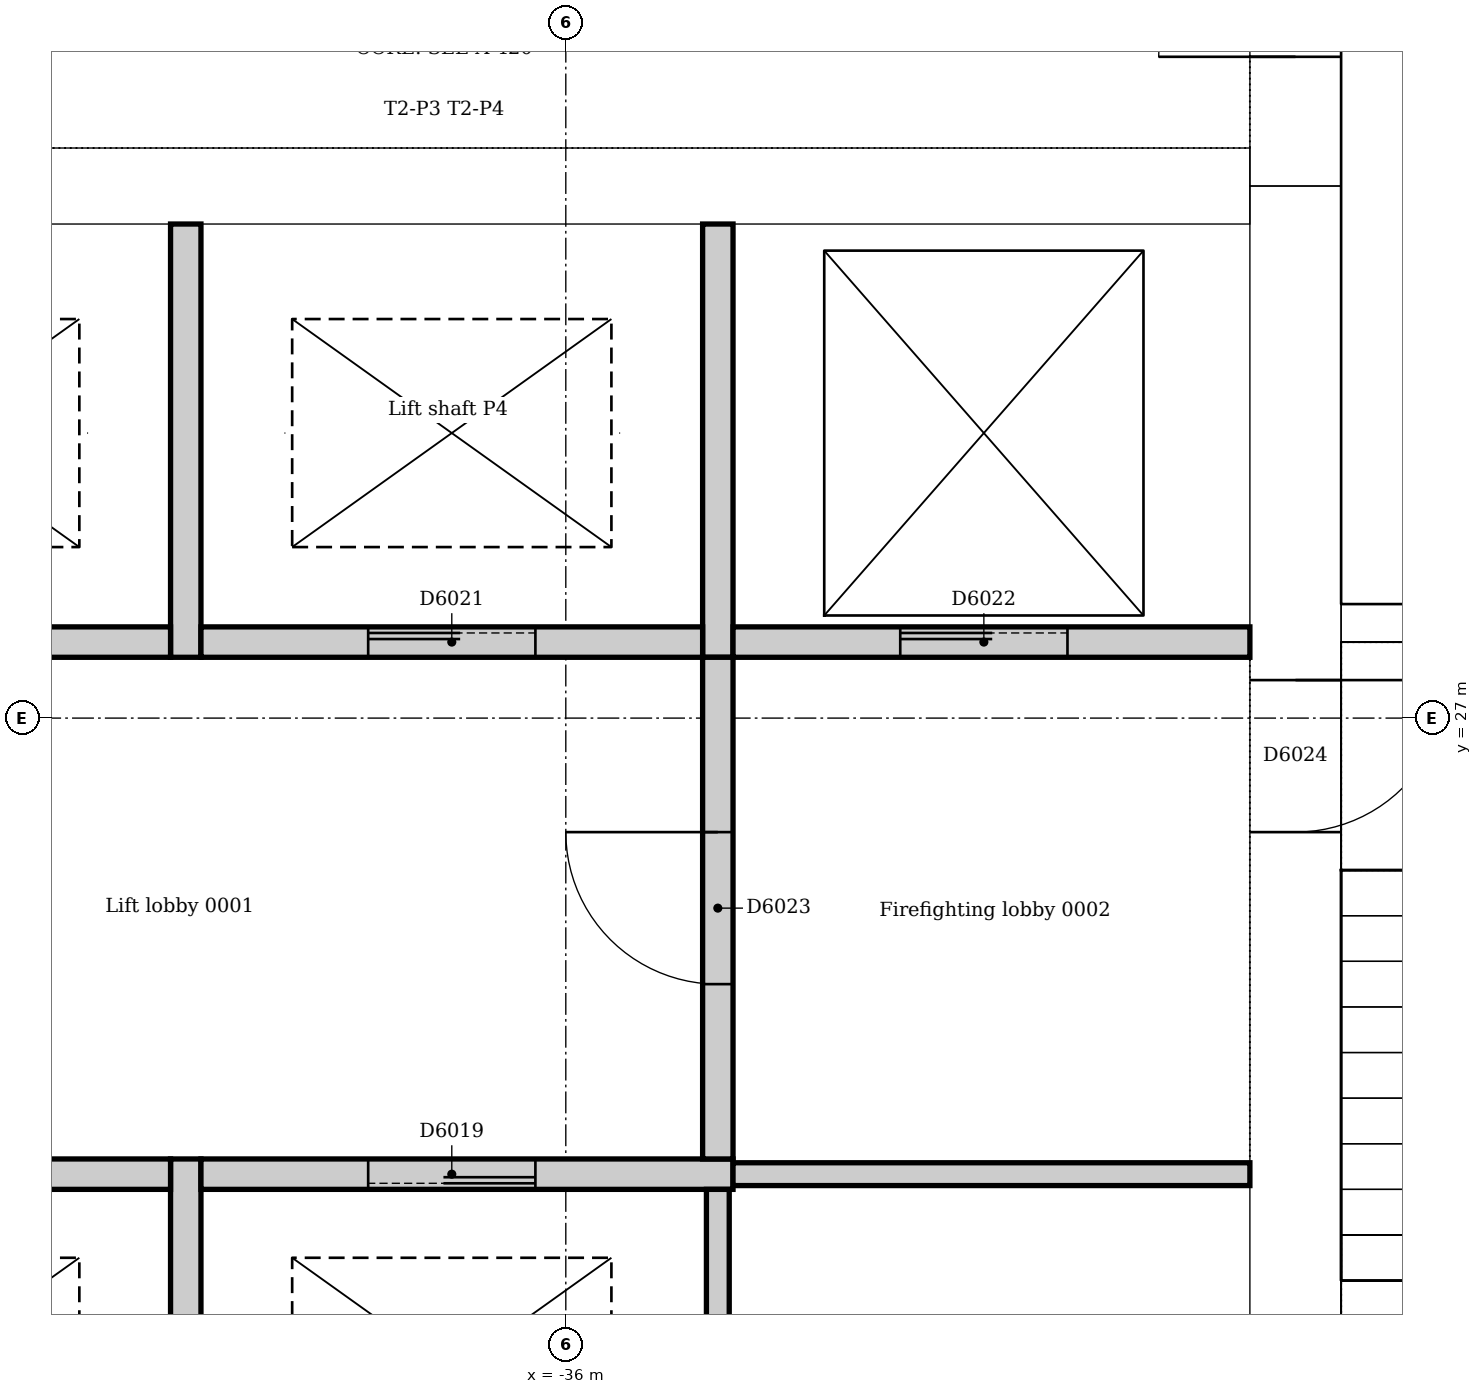
"""IFC4 building model, lengths in metres.
Left out: names, types, materials, properties, quantities, classifications, styles, units other than length and angle.
Written with IfcOpenShell. Run it as: python <this file> out.ifc"""

import sys

from ifc_helpers import new_model, si_unit, direction, frame, frame_2d, origin, place, context, subcontext, project, spatial, rectangle, extrude, element, fill, save


model = new_model("IFC4")
c1 = context("Model", 3, precision=1e-05, world=origin(), true_north=direction((0.0, 1.0)))
c2 = subcontext(c1, "Body", "Model", "MODEL_VIEW")
j1 = project(units=[si_unit("LENGTHUNIT", "METRE"), si_unit("PLANEANGLEUNIT", "RADIAN")], contexts=[c1])
p1 = place(None, origin())
s1 = spatial("IfcSite", under=j1, at=p1, CompositionType="ELEMENT")
p2 = place(p1, origin())
s2 = spatial("IfcBuilding", under=s1, at=p2, CompositionType="ELEMENT")
p3 = place(p2, origin())
s3 = spatial("IfcBuildingStorey", under=s2, at=p3, CompositionType="ELEMENT", Elevation=0.0)
p4 = place(p3, frame((-31.2, 21.0, 0.0), z_axis=(0.0, 0.0, 1.0), x_axis=(0.0, 1.0, 0.0)))
e1 = element("IfcWall", 1, at=p4, inside=s3, PredefinedType="SOLIDWALL", context=c2, shape_type="SweptSolid", body=[
    extrude(rectangle(XDim=9.5, YDim=0.6, at=frame_2d((4.75, 0.0))), origin(), (0.0, 0.0, 1.0), 6.0),
])
p5 = place(p4, frame((5.25, 0.0, 0.0)))
e2 = element("IfcOpeningElement", 2, at=p5, cuts=e1, PredefinedType="OPENING", context=c2, shape_type="SweptSolid", body=[
    extrude(rectangle(XDim=1.0, YDim=2.1, at=frame_2d((0.5, 1.05))), frame((0.0, 0.31, 0.0), z_axis=(0.0, -1.0, 0.0), x_axis=(1.0, 0.0, 0.0)), (0.0, 0.0, 1.0), 0.62),
])
p6 = place(p3, frame((-31.2, 30.5, 0.0), z_axis=(0.0, 0.0, 1.0), x_axis=(0.0, 1.0, 0.0)))
e3 = element("IfcWall", 3, at=p6, inside=s3, PredefinedType="SOLIDWALL", context=c2, shape_type="SweptSolid", body=[
    extrude(rectangle(XDim=11.5, YDim=0.6, at=frame_2d((5.75, 0.0))), origin(), (0.0, 0.0, 1.0), 6.0),
])
p7 = place(p6, frame((0.85, 0.0, 0.0)))
e4 = element("IfcOpeningElement", 4, at=p7, cuts=e3, PredefinedType="OPENING", context=c2, shape_type="SweptSolid", body=[
    extrude(rectangle(XDim=1.8, YDim=2.1, at=frame_2d((0.9, 1.05))), frame((0.0, 0.31, 0.0), z_axis=(0.0, -1.0, 0.0), x_axis=(1.0, 0.0, 0.0)), (0.0, 0.0, 1.0), 0.62),
])
p8 = place(p3, frame((-42.0, 30.5, 0.0), z_axis=(0.0, 0.0, 1.0), x_axis=(1.0, 0.0, 0.0)))
e5 = element("IfcWall", 5, at=p8, inside=s3, PredefinedType="SOLIDWALL", context=c2, shape_type="SweptSolid", body=[
    extrude(rectangle(XDim=10.5, YDim=0.5, at=frame_2d((5.25, 0.0))), origin(), (0.0, 0.0, 1.0), 6.0),
])
p9 = place(p3, frame((-27.36, 27.625, 0.0), z_axis=(0.0, 0.0, 1.0), x_axis=(-1.0, 0.0, 0.0)))
e6 = element("IfcWall", 6, at=p9, inside=s3, PredefinedType="SOLIDWALL", context=c2, shape_type="SweptSolid", body=[
    extrude(rectangle(XDim=3.54, YDim=0.25, at=frame_2d((1.77, 0.0))), origin(), (0.0, 0.0, 1.0), 6.0),
])
p10 = place(p9, frame((1.69, 0.0, 0.0)))
e7 = element("IfcOpeningElement", 7, at=p10, cuts=e6, PredefinedType="OPENING", context=c2, shape_type="SweptSolid", body=[
    extrude(rectangle(XDim=1.1, YDim=2.1, at=frame_2d((0.55, 1.05))), frame((0.0, 0.135, 0.0), z_axis=(0.0, -1.0, 0.0), x_axis=(1.0, 0.0, 0.0)), (0.0, 0.0, 1.0), 0.27),
])
p11 = place(p3, frame((-38.5, 21.0, 0.0), z_axis=(0.0, 0.0, 1.0), x_axis=(0.0, 1.0, 0.0)))
e8 = element("IfcWall", 8, at=p11, inside=s3, PredefinedType="SOLIDWALL", context=c2, shape_type="SweptSolid", body=[
    extrude(rectangle(XDim=3.1, YDim=0.2, at=frame_2d((1.55, 0.0))), origin(), (0.0, 0.0, 1.0), 6.0),
])
p12 = place(p3, frame((-38.6, 24.0, 0.0), z_axis=(0.0, 0.0, 1.0), x_axis=(-1.0, 0.0, 0.0)))
e9 = element("IfcWall", 9, at=p12, inside=s3, PredefinedType="SOLIDWALL", context=c2, shape_type="SweptSolid", body=[
    extrude(rectangle(XDim=3.4, YDim=0.2, at=frame_2d((1.7, 0.0))), origin(), (0.0, 0.0, 1.0), 6.0),
])
p13 = place(p12, frame((0.8, 0.0, 0.0)))
e10 = element("IfcOpeningElement", 10, at=p13, cuts=e9, PredefinedType="OPENING", context=c2, shape_type="SweptSolid", body=[
    extrude(rectangle(XDim=1.1, YDim=2.1, at=frame_2d((0.55, 1.05))), frame((0.0, 0.11, 0.0), z_axis=(0.0, -1.0, 0.0), x_axis=(1.0, 0.0, 0.0)), (0.0, 0.0, 1.0), 0.22),
])
p14 = place(p3, frame((-34.9, 24.0, 0.0), z_axis=(0.0, 0.0, 1.0), x_axis=(-1.0, 0.0, 0.0)))
e11 = element("IfcWall", 11, at=p14, inside=s3, PredefinedType="SOLIDWALL", context=c2, shape_type="SweptSolid", body=[
    extrude(rectangle(XDim=3.5, YDim=0.2, at=frame_2d((1.75, 0.0))), origin(), (0.0, 0.0, 1.0), 6.0),
])
p15 = place(p14, frame((1.3, 0.0, 0.0)))
e12 = element("IfcOpeningElement", 12, at=p15, cuts=e11, PredefinedType="OPENING", context=c2, shape_type="SweptSolid", body=[
    extrude(rectangle(XDim=1.1, YDim=2.1, at=frame_2d((0.55, 1.05))), frame((0.0, 0.11, 0.0), z_axis=(0.0, -1.0, 0.0), x_axis=(1.0, 0.0, 0.0)), (0.0, 0.0, 1.0), 0.22),
])
p16 = place(p3, frame((-38.5, 27.4, 0.0), z_axis=(0.0, 0.0, 1.0), x_axis=(0.0, 1.0, 0.0)))
e13 = element("IfcWall", 13, at=p16, inside=s3, PredefinedType="SOLIDWALL", context=c2, shape_type="SweptSolid", body=[
    extrude(rectangle(XDim=2.85, YDim=0.2, at=frame_2d((1.425, 0.0))), origin(), (0.0, 0.0, 1.0), 6.0),
])
p17 = place(p3, frame((-42.0, 27.5, 0.0), z_axis=(0.0, 0.0, 1.0), x_axis=(1.0, 0.0, 0.0)))
e14 = element("IfcWall", 14, at=p17, inside=s3, PredefinedType="SOLIDWALL", context=c2, shape_type="SweptSolid", body=[
    extrude(rectangle(XDim=3.4, YDim=0.2, at=frame_2d((1.7, 0.0))), origin(), (0.0, 0.0, 1.0), 6.0),
])
p18 = place(p17, frame((1.5, 0.0, 0.0)))
e15 = element("IfcOpeningElement", 15, at=p18, cuts=e14, PredefinedType="OPENING", context=c2, shape_type="SweptSolid", body=[
    extrude(rectangle(XDim=1.1, YDim=2.1, at=frame_2d((0.55, 1.05))), frame((0.0, 0.11, 0.0), z_axis=(0.0, -1.0, 0.0), x_axis=(1.0, 0.0, 0.0)), (0.0, 0.0, 1.0), 0.22),
])
p19 = place(p3, frame((-35.0, 27.4, 0.0), z_axis=(0.0, 0.0, 1.0), x_axis=(0.0, 1.0, 0.0)))
e16 = element("IfcWall", 16, at=p19, inside=s3, PredefinedType="SOLIDWALL", context=c2, shape_type="SweptSolid", body=[
    extrude(rectangle(XDim=2.85, YDim=0.2, at=frame_2d((1.425, 0.0))), origin(), (0.0, 0.0, 1.0), 6.0),
])
p20 = place(p3, frame((-38.4, 27.5, 0.0), z_axis=(0.0, 0.0, 1.0), x_axis=(1.0, 0.0, 0.0)))
e17 = element("IfcWall", 17, at=p20, inside=s3, PredefinedType="SOLIDWALL", context=c2, shape_type="SweptSolid", body=[
    extrude(rectangle(XDim=3.3, YDim=0.2, at=frame_2d((1.65, 0.0))), origin(), (0.0, 0.0, 1.0), 6.0),
])
p21 = place(p20, frame((1.1, 0.0, 0.0)))
e18 = element("IfcOpeningElement", 18, at=p21, cuts=e17, PredefinedType="OPENING", context=c2, shape_type="SweptSolid", body=[
    extrude(rectangle(XDim=1.1, YDim=2.1, at=frame_2d((0.55, 1.05))), frame((0.0, 0.11, 0.0), z_axis=(0.0, -1.0, 0.0), x_axis=(1.0, 0.0, 0.0)), (0.0, 0.0, 1.0), 0.22),
])
p22 = place(p3, frame((-34.9, 27.5, 0.0), z_axis=(0.0, 0.0, 1.0), x_axis=(1.0, 0.0, 0.0)))
e19 = element("IfcWall", 19, at=p22, inside=s3, PredefinedType="SOLIDWALL", context=c2, shape_type="SweptSolid", body=[
    extrude(rectangle(XDim=3.4, YDim=0.2, at=frame_2d((1.7, 0.0))), origin(), (0.0, 0.0, 1.0), 6.0),
])
p23 = place(p22, frame((1.1, 0.0, 0.0)))
e20 = element("IfcOpeningElement", 20, at=p23, cuts=e19, PredefinedType="OPENING", context=c2, shape_type="SweptSolid", body=[
    extrude(rectangle(XDim=1.1, YDim=2.1, at=frame_2d((0.55, 1.05))), frame((0.0, 0.11, 0.0), z_axis=(0.0, -1.0, 0.0), x_axis=(1.0, 0.0, 0.0)), (0.0, 0.0, 1.0), 0.22),
])
p24 = place(p3, frame((-35.0, 24.1, 0.0), z_axis=(0.0, 0.0, 1.0), x_axis=(0.0, 1.0, 0.0)))
e21 = element("IfcWall", 21, at=p24, inside=s3, PredefinedType="SOLIDWALL", context=c2, shape_type="SweptSolid", body=[
    extrude(rectangle(XDim=3.3, YDim=0.2, at=frame_2d((1.65, 0.0))), origin(), (0.0, 0.0, 1.0), 6.0),
])
p25 = place(p24, frame((1.15, 0.0, 0.0)))
e22 = element("IfcOpeningElement", 22, at=p25, cuts=e21, PredefinedType="OPENING", context=c2, shape_type="SweptSolid", body=[
    extrude(rectangle(XDim=1.0, YDim=2.1, at=frame_2d((0.5, 1.05))), frame((0.0, 0.11, 0.0), z_axis=(0.0, -1.0, 0.0), x_axis=(1.0, 0.0, 0.0)), (0.0, 0.0, 1.0), 0.22),
])
p26 = place(p3, frame((-35.0, 21.0, 0.0), z_axis=(0.0, 0.0, 1.0), x_axis=(0.0, 1.0, 0.0)))
e23 = element("IfcWall", 23, at=p26, inside=s3, PredefinedType="SOLIDWALL", context=c2, shape_type="SweptSolid", body=[
    extrude(rectangle(XDim=2.9, YDim=0.15, at=frame_2d((1.45, 0.0))), origin(), (0.0, 0.0, 1.0), 6.0),
])
p27 = place(p3, frame((-31.5, 24.0, 0.0), z_axis=(0.0, 0.0, 1.0), x_axis=(-1.0, 0.0, 0.0)))
e24 = element("IfcWall", 24, at=p27, inside=s3, PredefinedType="SOLIDWALL", context=c2, shape_type="SweptSolid", body=[
    extrude(rectangle(XDim=3.4, YDim=0.15, at=frame_2d((1.7, 0.0))), origin(), (0.0, 0.0, 1.0), 6.0),
])
p28 = place(p15, origin())
e25 = element("IfcDoor", 25, at=p28, inside=s3, OperationType="SLIDING_TO_LEFT", PredefinedType="DOOR", context=c2, shape_type="SweptSolid", body=[
    extrude(rectangle(XDim=1.1, YDim=2.1, at=frame_2d((0.55, 1.05))), frame((0.0, 0.025, 0.0), z_axis=(0.0, -1.0, 0.0), x_axis=(1.0, 0.0, 0.0)), (0.0, 0.0, 1.0), 0.05),
])
fill(e12, e25)
p29 = place(p21, origin())
e26 = element("IfcDoor", 26, at=p29, inside=s3, OperationType="SLIDING_TO_LEFT", PredefinedType="DOOR", context=c2, shape_type="SweptSolid", body=[
    extrude(rectangle(XDim=1.1, YDim=2.1, at=frame_2d((0.55, 1.05))), frame((0.0, 0.025, 0.0), z_axis=(0.0, -1.0, 0.0), x_axis=(1.0, 0.0, 0.0)), (0.0, 0.0, 1.0), 0.05),
])
fill(e18, e26)
p30 = place(p23, origin())
e27 = element("IfcDoor", 27, at=p30, inside=s3, OperationType="SLIDING_TO_LEFT", PredefinedType="DOOR", context=c2, shape_type="SweptSolid", body=[
    extrude(rectangle(XDim=1.1, YDim=2.1, at=frame_2d((0.55, 1.05))), frame((0.0, 0.025, 0.0), z_axis=(0.0, -1.0, 0.0), x_axis=(1.0, 0.0, 0.0)), (0.0, 0.0, 1.0), 0.05),
])
fill(e20, e27)
p31 = place(p25, origin())
e28 = element("IfcDoor", 28, at=p31, inside=s3, OperationType="SINGLE_SWING_RIGHT", PredefinedType="DOOR", context=c2, shape_type="SweptSolid", body=[
    extrude(rectangle(XDim=1.0, YDim=2.1, at=frame_2d((0.5, 1.05))), frame((0.0, 0.025, 0.0), z_axis=(0.0, -1.0, 0.0), x_axis=(1.0, 0.0, 0.0)), (0.0, 0.0, 1.0), 0.05),
])
fill(e22, e28)
p32 = place(p5, frame((1.0, 0.0, 0.0), z_axis=(0.0, 0.0, 1.0), x_axis=(-1.0, 0.0, 0.0)))
e29 = element("IfcDoor", 29, at=p32, inside=s3, OperationType="SINGLE_SWING_LEFT", PredefinedType="DOOR", context=c2, shape_type="SweptSolid", body=[
    extrude(rectangle(XDim=1.0, YDim=2.1, at=frame_2d((0.5, 1.05))), frame((0.0, 0.025, 0.0), z_axis=(0.0, -1.0, 0.0), x_axis=(1.0, 0.0, 0.0)), (0.0, 0.0, 1.0), 0.05),
])
fill(e2, e29)
p33 = place(p7, origin())
e30 = element("IfcDoor", 30, at=p33, inside=s3, OperationType="DOUBLE_DOOR_SINGLE_SWING", PredefinedType="DOOR", context=c2, shape_type="SweptSolid", body=[
    extrude(rectangle(XDim=1.8, YDim=2.1, at=frame_2d((0.9, 1.05))), frame((0.0, 0.025, 0.0), z_axis=(0.0, -1.0, 0.0), x_axis=(1.0, 0.0, 0.0)), (0.0, 0.0, 1.0), 0.05),
])
fill(e4, e30)
save(model, sys.argv[1])
